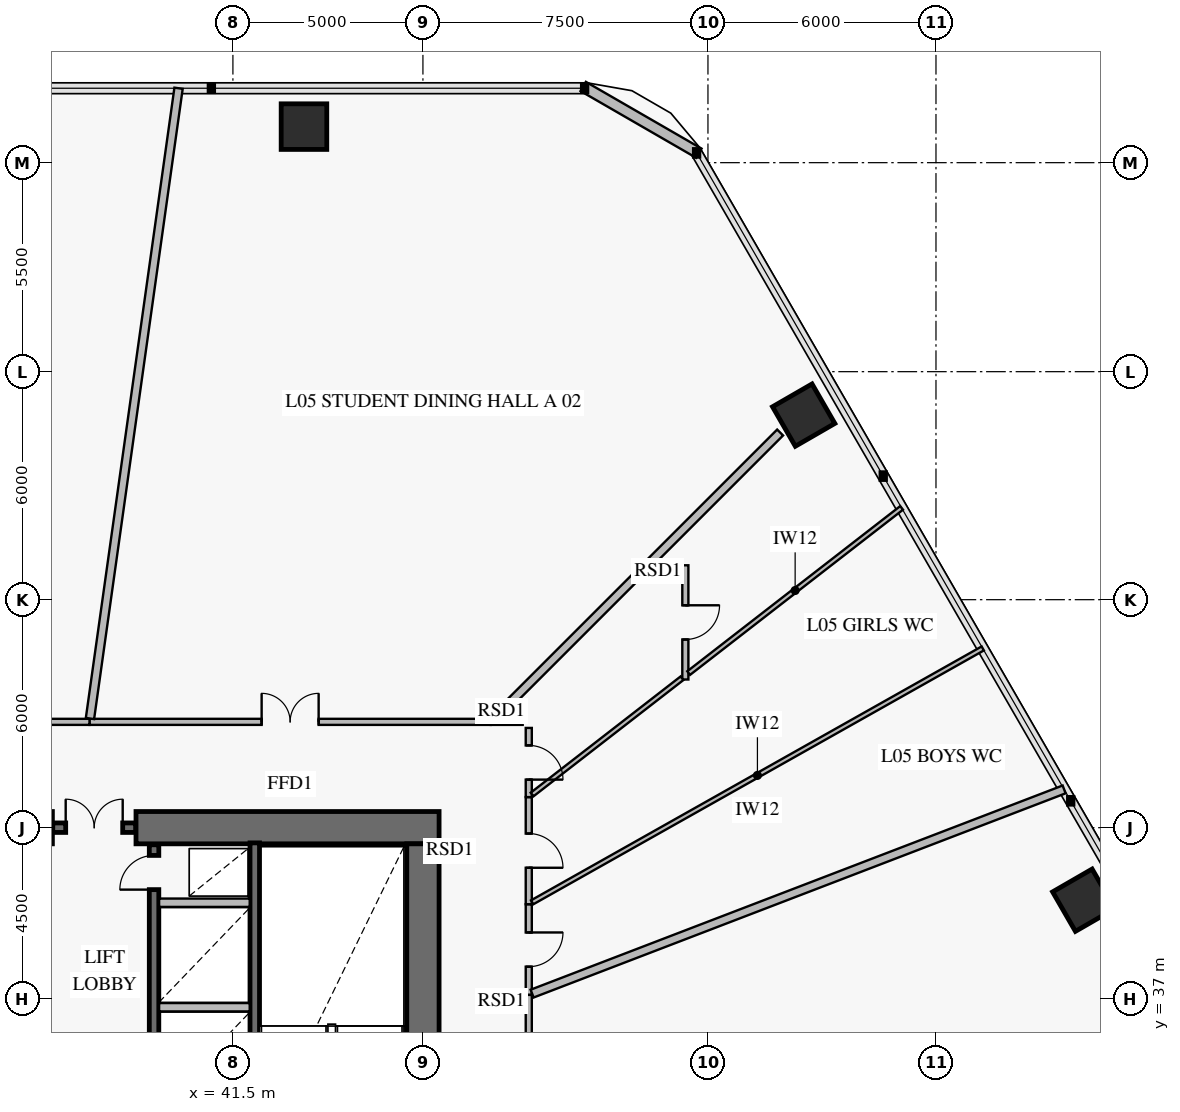
"""IFC4 building model, lengths in metres.
Left out: names, types, materials, properties, quantities, classifications, styles, units other than length and angle.
Written with IfcOpenShell. Run it as: python <this file> out.ifc"""

import sys

from ifc_helpers import new_model, si_unit, direction, frame, frame_2d, origin, origin_2d, place, context, subcontext, project, spatial, rectangle, extrude, element, fill, save


model = new_model("IFC4")
c1 = context("Model", 3, precision=1e-05, world=origin(), true_north=direction((0.0, 1.0)))
c2 = subcontext(c1, "Body", "Model", "MODEL_VIEW")
j1 = project(units=[si_unit("LENGTHUNIT", "METRE"), si_unit("PLANEANGLEUNIT", "RADIAN")], contexts=[c1])
p1 = place(None, origin())
s1 = spatial("IfcSite", under=j1, at=p1, CompositionType="ELEMENT")
p2 = place(p1, origin())
s2 = spatial("IfcBuilding", under=s1, at=p2, CompositionType="ELEMENT")
p3 = place(p2, frame((0.0, 0.0, 20.4)))
s3 = spatial("IfcBuildingStorey", under=s2, at=p3, CompositionType="ELEMENT", Elevation=20.4)
p4 = place(p3, frame((46.925, 41.5, 0.0), z_axis=(0.0, 0.0, 1.0), x_axis=(-1.0, 0.0, 0.0)))
e1 = element("IfcWall", 1, at=p4, inside=s3, PredefinedType="SHEAR", context=c2, shape_type="SweptSolid", body=[
    extrude(rectangle(XDim=7.975, YDim=0.85, at=frame_2d((3.988, 0.0))), origin(), (0.0, 0.0, 1.0), 4.2),
])
p5 = place(p3, frame((36.75, 41.5, 0.0), z_axis=(0.0, 0.0, 1.0), x_axis=(-1.0, 0.0, 0.0)))
e2 = element("IfcWall", 2, at=p5, inside=s3, PredefinedType="SHEAR", context=c2, shape_type="SweptSolid", body=[
    extrude(rectangle(XDim=11.675, YDim=0.85, at=frame_2d((5.837, 0.0))), origin(), (0.0, 0.0, 1.0), 4.2),
])
p6 = place(p5, frame((4.25, 0.0, 0.0)))
e3 = element("IfcOpeningElement", 3, at=p6, cuts=e2, PredefinedType="OPENING", context=c2, shape_type="SweptSolid", body=[
    extrude(rectangle(XDim=1.1, YDim=2.15, at=frame_2d((0.55, 1.075))), frame((0.0, 0.437, 0.0), z_axis=(0.0, -1.0, 0.0), x_axis=(1.0, 0.0, 0.0)), (0.0, 0.0, 1.0), 0.874),
])
p7 = place(p3, frame((46.5, 22.925, 0.0), z_axis=(0.0, 0.0, 1.0), x_axis=(0.0, 1.0, 0.0)))
e4 = element("IfcWall", 4, at=p7, inside=s3, PredefinedType="SHEAR", context=c2, shape_type="SweptSolid", body=[
    extrude(rectangle(XDim=18.15, YDim=0.85, at=frame_2d((9.075, 0.0))), origin(), (0.0, 0.0, 1.0), 4.2),
])
p8 = place(p7, frame((8.825, 0.0, 0.0)))
e5 = element("IfcOpeningElement", 5, at=p8, cuts=e4, PredefinedType="OPENING", context=c2, shape_type="SweptSolid", body=[
    extrude(rectangle(XDim=1.1, YDim=2.15, at=frame_2d((0.55, 1.075))), frame((0.0, 0.437, 0.0), z_axis=(0.0, -1.0, 0.0), x_axis=(1.0, 0.0, 0.0)), (0.0, 0.0, 1.0), 0.874),
])
for number, where, z_axis, x_axis in (
    (6, (63.889, 39.592, 0.0), (0.0, 0.0, 1.0), (-0.5, 0.866, 0.0)),
    (7, (56.519, 52.357, 0.0), (0.0, 0.0, 1.0), (-0.5, 0.866, 0.0)),
    (8, (43.37, 59.948, 0.0), (0.0, 0.0, 1.0), (-1.0, 0.0, 0.0)),
):
    element("IfcColumn", number, at=place(p3, frame(where, z_axis=z_axis, x_axis=x_axis)), inside=s3, PredefinedType="COLUMN", context=c2, shape_type="SweptSolid", body=[
        extrude(rectangle(XDim=1.2, YDim=1.2, at=origin_2d()), origin(), (0.0, 0.0, 1.0), 3.92),
    ])
p9 = place(p3, frame((50.717, 61.006, 0.0), z_axis=(0.0, 0.0, 1.0), x_axis=(0.866007452331, -0.500031091541, 0.0)))
e9 = element("IfcWall", 9, at=p9, inside=s3, PredefinedType="SOLIDWALL", context=c2, shape_type="SweptSolid", body=[
    extrude(rectangle(XDim=3.515, YDim=0.28, at=frame_2d((1.757, 0.0))), origin(), (0.0, 0.0, 1.0), 3.92),
])
p10 = place(p3, frame((36.76, 41.5, 0.0), z_axis=(0.0, 0.0, 1.0), x_axis=(1.0, 0.0, 0.0)))
e10 = element("IfcWall", 10, at=p10, inside=s3, PredefinedType="SOLIDWALL", context=c2, shape_type="SweptSolid", body=[
    extrude(rectangle(XDim=2.18, YDim=0.25, at=frame_2d((1.09, 0.0))), origin(), (0.0, 0.0, 1.0), 4.2),
])
p11 = place(p10, frame((0.34, 0.0, 0.0)))
e11 = element("IfcOpeningElement", 11, at=p11, cuts=e10, PredefinedType="OPENING", context=c2, shape_type="SweptSolid", body=[
    extrude(rectangle(XDim=1.5, YDim=2.15, at=frame_2d((0.75, 1.075))), frame((0.0, 0.137, 0.0), z_axis=(0.0, -1.0, 0.0), x_axis=(1.0, 0.0, 0.0)), (0.0, 0.0, 1.0), 0.274),
])
p12 = place(p3, frame((42.075, 31.4, 0.0), z_axis=(0.0, 0.0, 1.0), x_axis=(0.0, 1.0, 0.0)))
e12 = element("IfcWall", 12, at=p12, inside=s3, PredefinedType="SOLIDWALL", context=c2, shape_type="SweptSolid", body=[
    extrude(rectangle(XDim=9.7, YDim=0.25, at=frame_2d((4.85, 0.0))), origin(), (0.0, 0.0, 1.0), 4.2),
])
p13 = place(p3, frame((39.425, 31.4, 0.0), z_axis=(0.0, 0.0, 1.0), x_axis=(0.0, 1.0, 0.0)))
e13 = element("IfcWall", 13, at=p13, inside=s3, PredefinedType="SOLIDWALL", context=c2, shape_type="SweptSolid", body=[
    extrude(rectangle(XDim=9.65, YDim=0.25, at=frame_2d((4.825, 0.0))), origin(), (0.0, 0.0, 1.0), 4.2),
])
p14 = place(p13, frame((8.47, 0.0, 0.0)))
e14 = element("IfcOpeningElement", 14, at=p14, cuts=e13, PredefinedType="OPENING", context=c2, shape_type="SweptSolid", body=[
    extrude(rectangle(XDim=0.9, YDim=2.1, at=frame_2d((0.45, 1.05))), frame((0.0, 0.137, 0.0), z_axis=(0.0, -1.0, 0.0), x_axis=(1.0, 0.0, 0.0)), (0.0, 0.0, 1.0), 0.274),
])
p15 = place(p3, frame((49.285, 37.1, 0.0), z_axis=(0.0, 0.0, 1.0), x_axis=(0.0, 1.0, 0.0)))
e15 = element("IfcWall", 15, at=p15, inside=s3, PredefinedType="PARTITIONING", context=c2, shape_type="SweptSolid", body=[
    extrude(rectangle(XDim=2.386, YDim=0.16, at=frame_2d((1.193, 0.0))), origin(), (0.0, 0.0, 1.0), 3.92),
])
p16 = place(p15, frame((0.743, 0.0, 0.0)))
e16 = element("IfcOpeningElement", 16, at=p16, cuts=e15, PredefinedType="OPENING", context=c2, shape_type="SweptSolid", body=[
    extrude(rectangle(XDim=0.9, YDim=2.1, at=frame_2d((0.45, 1.05))), frame((0.0, 0.092, 0.0), z_axis=(0.0, -1.0, 0.0), x_axis=(1.0, 0.0, 0.0)), (0.0, 0.0, 1.0), 0.184),
])
p17 = place(p3, frame((49.285, 39.486, 0.0), z_axis=(0.0, 0.0, 1.0), x_axis=(0.0, 1.0, 0.0)))
e17 = element("IfcWall", 17, at=p17, inside=s3, PredefinedType="PARTITIONING", context=c2, shape_type="SweptSolid", body=[
    extrude(rectangle(XDim=2.819, YDim=0.16, at=frame_2d((1.41, 0.0))), origin(), (0.0, 0.0, 1.0), 3.92),
])
p18 = place(p17, frame((0.96, 0.0, 0.0)))
e18 = element("IfcOpeningElement", 18, at=p18, cuts=e17, PredefinedType="OPENING", context=c2, shape_type="SweptSolid", body=[
    extrude(rectangle(XDim=0.9, YDim=2.1, at=frame_2d((0.45, 1.05))), frame((0.0, 0.092, 0.0), z_axis=(0.0, -1.0, 0.0), x_axis=(1.0, 0.0, 0.0)), (0.0, 0.0, 1.0), 0.184),
])
p19 = place(p3, frame((53.405, 48.405, 0.0), z_axis=(0.0, 0.0, 1.0), x_axis=(0.0, -1.0, 0.0)))
e19 = element("IfcWall", 19, at=p19, inside=s3, PredefinedType="PARTITIONING", context=c2, shape_type="SweptSolid", body=[
    extrude(rectangle(XDim=3.006, YDim=0.16, at=frame_2d((1.503, 0.0))), origin(), (0.0, 0.0, 1.0), 3.92),
])
p20 = place(p19, frame((1.053, 0.0, 0.0)))
e20 = element("IfcOpeningElement", 20, at=p20, cuts=e19, PredefinedType="OPENING", context=c2, shape_type="SweptSolid", body=[
    extrude(rectangle(XDim=0.9, YDim=2.1, at=frame_2d((0.45, 1.05))), frame((0.0, 0.092, 0.0), z_axis=(0.0, -1.0, 0.0), x_axis=(1.0, 0.0, 0.0)), (0.0, 0.0, 1.0), 0.184),
])
p21 = place(p3, frame((49.285, 42.305, 0.0), z_axis=(0.0, 0.0, 1.0), x_axis=(0.0, 1.0, 0.0)))
e21 = element("IfcWall", 21, at=p21, inside=s3, PredefinedType="PARTITIONING", context=c2, shape_type="SweptSolid", body=[
    extrude(rectangle(XDim=1.82, YDim=0.16, at=frame_2d((0.91, 0.0))), origin(), (0.0, 0.0, 1.0), 3.92),
])
p22 = place(p21, frame((0.46, 0.0, 0.0)))
e22 = element("IfcOpeningElement", 22, at=p22, cuts=e21, PredefinedType="OPENING", context=c2, shape_type="SweptSolid", body=[
    extrude(rectangle(XDim=0.9, YDim=2.1, at=frame_2d((0.45, 1.05))), frame((0.0, 0.092, 0.0), z_axis=(0.0, -1.0, 0.0), x_axis=(1.0, 0.0, 0.0)), (0.0, 0.0, 1.0), 0.184),
])
p23 = place(p3, frame((48.285, 44.285, 0.0), z_axis=(0.0, 0.0, 1.0), x_axis=(-1.0, 0.0, 0.0)))
e23 = element("IfcWall", 23, at=p23, inside=s3, PredefinedType="PARTITIONING", context=c2, shape_type="SweptSolid", body=[
    extrude(rectangle(XDim=10.558, YDim=0.16, at=frame_2d((5.279, 0.0))), origin(), (0.0, 0.0, 1.0), 3.22),
])
p24 = place(p23, frame((4.529, 0.0, 0.0)))
e24 = element("IfcOpeningElement", 24, at=p24, cuts=e23, PredefinedType="OPENING", context=c2, shape_type="SweptSolid", body=[
    extrude(rectangle(XDim=1.5, YDim=2.15, at=frame_2d((0.75, 1.075))), frame((0.0, 0.092, 0.0), z_axis=(0.0, -1.0, 0.0), x_axis=(1.0, 0.0, 0.0)), (0.0, 0.0, 1.0), 0.184),
])
p25 = place(p3, frame((37.727, 44.285, 0.0), z_axis=(0.0, 0.0, 1.0), x_axis=(-1.0, 0.0, 0.0)))
e25 = element("IfcWall", 25, at=p25, inside=s3, PredefinedType="PARTITIONING", context=c2, shape_type="SweptSolid", body=[
    extrude(rectangle(XDim=8.536, YDim=0.16, at=frame_2d((4.268, 0.0))), origin(), (0.0, 0.0, 1.0), 3.22),
])
p26 = place(p25, frame((3.518, 0.0, 0.0)))
e26 = element("IfcOpeningElement", 26, at=p26, cuts=e25, PredefinedType="OPENING", context=c2, shape_type="SweptSolid", body=[
    extrude(rectangle(XDim=1.5, YDim=2.15, at=frame_2d((0.75, 1.075))), frame((0.0, 0.092, 0.0), z_axis=(0.0, -1.0, 0.0), x_axis=(1.0, 0.0, 0.0)), (0.0, 0.0, 1.0), 0.184),
])
p27 = place(p3, frame((49.285, 27.683, 0.0), z_axis=(0.0, 0.0, 1.0), x_axis=(0.0, 1.0, 0.0)))
e27 = element("IfcWall", 27, at=p27, inside=s3, PredefinedType="PARTITIONING", context=c2, shape_type="SweptSolid", body=[
    extrude(rectangle(XDim=9.416, YDim=0.16, at=frame_2d((4.708, 0.0))), origin(), (0.0, 0.0, 1.0), 3.22),
])
p28 = place(p27, frame((4.233, 0.0, 0.0)))
e28 = element("IfcOpeningElement", 28, at=p28, cuts=e27, PredefinedType="OPENING", context=c2, shape_type="SweptSolid", body=[
    extrude(rectangle(XDim=0.95, YDim=2.1, at=frame_2d((0.475, 1.05))), frame((0.0, 0.092, 0.0), z_axis=(0.0, -1.0, 0.0), x_axis=(1.0, 0.0, 0.0)), (0.0, 0.0, 1.0), 0.184),
])
for number, where, z_axis, x_axis in (
    (29, (39.558, 36.775, 0.0), (0.0, 0.0, 1.0), (1.0, 0.0, 0.0)),
    (30, (39.558, 39.525, 0.0), (0.0, 0.0, 1.0), (1.0, 0.0, 0.0)),
):
    element("IfcWall", number, at=place(p3, frame(where, z_axis=z_axis, x_axis=x_axis)), inside=s3, PredefinedType="PARTITIONING", context=c2, shape_type="SweptSolid", body=[
        extrude(rectangle(XDim=2.384, YDim=0.22, at=frame_2d((1.192, 0.0))), origin(), (0.0, 0.0, 1.0), 3.92),
    ])
p29 = place(p3, frame((49.373, 37.134, 0.0), z_axis=(0.0, 0.0, 1.0), x_axis=(0.933584586871, 0.358357111214, 0.0)))
e31 = element("IfcWall", 31, at=p29, inside=s3, PredefinedType="PARTITIONING", context=c2, shape_type="SweptSolid", body=[
    extrude(rectangle(XDim=14.995, YDim=0.22, at=frame_2d((7.498, 0.0))), origin(), (0.0, 0.0, 1.0), 3.17),
])
p30 = place(p3, frame((49.373, 39.535, 0.0), z_axis=(0.0, 0.0, 1.0), x_axis=(0.871218886354, 0.490894746417, 0.0)))
e32 = element("IfcWall", 32, at=p30, inside=s3, PredefinedType="PARTITIONING", context=c2, shape_type="SweptSolid", body=[
    extrude(rectangle(XDim=13.61, YDim=0.12, at=frame_2d((6.805, 0.0))), origin(), (0.0, 0.0, 1.0), 3.17),
])
p31 = place(p3, frame((49.373, 42.373, 0.0), z_axis=(0.0, 0.0, 1.0), x_axis=(0.790162754328, 0.612897072658, 0.0)))
e33 = element("IfcWall", 33, at=p31, inside=s3, PredefinedType="PARTITIONING", context=c2, shape_type="SweptSolid", body=[
    extrude(rectangle(XDim=4.991, YDim=0.12, at=frame_2d((2.496, 0.0))), origin(), (0.0, 0.0, 1.0), 3.47),
])
p32 = place(p3, frame((53.493, 45.569, 0.0), z_axis=(0.0, 0.0, 1.0), x_axis=(0.79017658067, 0.612879246965, 0.0)))
e34 = element("IfcWall", 34, at=p32, inside=s3, PredefinedType="PARTITIONING", context=c2, shape_type="SweptSolid", body=[
    extrude(rectangle(XDim=7.09, YDim=0.12, at=frame_2d((3.545, 0.0))), origin(), (0.0, 0.0, 1.0), 3.17),
])
p33 = place(p3, frame((52.292, 48.405, 0.0), z_axis=(0.0, 0.0, 1.0), x_axis=(1.0, 0.0, 0.0)))
e35 = element("IfcWall", 35, at=p33, inside=s3, PredefinedType="PARTITIONING", context=c2, shape_type="SweptSolid", body=[
    extrude(rectangle(XDim=1.025, YDim=0.16, at=frame_2d((0.512, 0.0))), origin(), (0.0, 0.0, 1.0), 3.22),
])
p34 = place(p3, frame((49.125, 44.285, 0.0), z_axis=(0.0, 0.0, 1.0), x_axis=(-1.0, 0.0, 0.0)))
e36 = element("IfcWall", 36, at=p34, inside=s3, PredefinedType="PARTITIONING", context=c2, shape_type="SweptSolid", body=[
    extrude(rectangle(XDim=0.84, YDim=0.16, at=frame_2d((0.42, 0.0))), origin(), (0.0, 0.0, 1.0), 3.22),
])
p35 = place(p3, frame((48.373, 44.373, 0.0), z_axis=(0.0, 0.0, 1.0), x_axis=(0.707106781187, 0.707106781187, 0.0)))
e37 = element("IfcWall", 37, at=p35, inside=s3, PredefinedType="PARTITIONING", context=c2, shape_type="SweptSolid", body=[
    extrude(rectangle(XDim=5.577, YDim=0.22, at=frame_2d((2.789, 0.0))), origin(), (0.0, 0.0, 1.0), 3.22),
])
p36 = place(p3, frame((52.493, 48.493, 0.0), z_axis=(0.0, 0.0, 1.0), x_axis=(0.707106781187, 0.707106781187, 0.0)))
e38 = element("IfcWall", 38, at=p36, inside=s3, PredefinedType="PARTITIONING", context=c2, shape_type="SweptSolid", body=[
    extrude(rectangle(XDim=4.817, YDim=0.22, at=frame_2d((2.408, 0.0))), origin(), (0.0, 0.0, 1.0), 3.22),
])
p37 = place(p3, frame((37.739, 44.373, 0.0), z_axis=(0.0, 0.0, 1.0), x_axis=(0.139165938444, 0.990269075341, 0.0)))
e39 = element("IfcWall", 39, at=p37, inside=s3, PredefinedType="PARTITIONING", context=c2, shape_type="SweptSolid", body=[
    extrude(rectangle(XDim=16.749, YDim=0.22, at=frame_2d((8.374, 0.0))), origin(), (0.0, 0.0, 1.0), 3.17),
])
p38 = place(p11, origin())
e40 = element("IfcDoor", 40, at=p38, inside=s3, OperationType="DOUBLE_DOOR_SINGLE_SWING", PredefinedType="DOOR", context=c2, shape_type="SweptSolid", body=[
    extrude(rectangle(XDim=1.5, YDim=2.15, at=frame_2d((0.75, 1.075))), frame((0.0, 0.025, 0.0), z_axis=(0.0, -1.0, 0.0), x_axis=(1.0, 0.0, 0.0)), (0.0, 0.0, 1.0), 0.05),
])
fill(e11, e40)
p39 = place(p14, origin())
e41 = element("IfcDoor", 41, at=p39, inside=s3, OperationType="SINGLE_SWING_LEFT", PredefinedType="DOOR", context=c2, shape_type="SweptSolid", body=[
    extrude(rectangle(XDim=0.9, YDim=2.1, at=frame_2d((0.45, 1.05))), frame((0.0, 0.025, 0.0), z_axis=(0.0, -1.0, 0.0), x_axis=(1.0, 0.0, 0.0)), (0.0, 0.0, 1.0), 0.05),
])
fill(e14, e41)
p40 = place(p16, frame((0.9, 0.0, 0.0), z_axis=(0.0, 0.0, 1.0), x_axis=(-1.0, 0.0, 0.0)))
e42 = element("IfcDoor", 42, at=p40, inside=s3, OperationType="SINGLE_SWING_LEFT", PredefinedType="DOOR", context=c2, shape_type="SweptSolid", body=[
    extrude(rectangle(XDim=0.9, YDim=2.1, at=frame_2d((0.45, 1.05))), frame((0.0, 0.025, 0.0), z_axis=(0.0, -1.0, 0.0), x_axis=(1.0, 0.0, 0.0)), (0.0, 0.0, 1.0), 0.05),
])
fill(e16, e42)
p41 = place(p18, frame((0.9, 0.0, 0.0), z_axis=(0.0, 0.0, 1.0), x_axis=(-1.0, 0.0, 0.0)))
e43 = element("IfcDoor", 43, at=p41, inside=s3, OperationType="SINGLE_SWING_RIGHT", PredefinedType="DOOR", context=c2, shape_type="SweptSolid", body=[
    extrude(rectangle(XDim=0.9, YDim=2.1, at=frame_2d((0.45, 1.05))), frame((0.0, 0.025, 0.0), z_axis=(0.0, -1.0, 0.0), x_axis=(1.0, 0.0, 0.0)), (0.0, 0.0, 1.0), 0.05),
])
fill(e18, e43)
p42 = place(p20, origin())
e44 = element("IfcDoor", 44, at=p42, inside=s3, OperationType="SINGLE_SWING_LEFT", PredefinedType="DOOR", context=c2, shape_type="SweptSolid", body=[
    extrude(rectangle(XDim=0.9, YDim=2.1, at=frame_2d((0.45, 1.05))), frame((0.0, 0.025, 0.0), z_axis=(0.0, -1.0, 0.0), x_axis=(1.0, 0.0, 0.0)), (0.0, 0.0, 1.0), 0.05),
])
fill(e20, e44)
p43 = place(p22, frame((0.9, 0.0, 0.0), z_axis=(0.0, 0.0, 1.0), x_axis=(-1.0, 0.0, 0.0)))
e45 = element("IfcDoor", 45, at=p43, inside=s3, OperationType="SINGLE_SWING_RIGHT", PredefinedType="DOOR", context=c2, shape_type="SweptSolid", body=[
    extrude(rectangle(XDim=0.9, YDim=2.1, at=frame_2d((0.45, 1.05))), frame((0.0, 0.025, 0.0), z_axis=(0.0, -1.0, 0.0), x_axis=(1.0, 0.0, 0.0)), (0.0, 0.0, 1.0), 0.05),
])
fill(e22, e45)
p44 = place(p24, frame((1.5, 0.0, 0.0), z_axis=(0.0, 0.0, 1.0), x_axis=(-1.0, 0.0, 0.0)))
e46 = element("IfcDoor", 46, at=p44, inside=s3, OperationType="DOUBLE_DOOR_SINGLE_SWING", PredefinedType="DOOR", context=c2, shape_type="SweptSolid", body=[
    extrude(rectangle(XDim=1.5, YDim=2.15, at=frame_2d((0.75, 1.075))), frame((0.0, 0.025, 0.0), z_axis=(0.0, -1.0, 0.0), x_axis=(1.0, 0.0, 0.0)), (0.0, 0.0, 1.0), 0.05),
])
fill(e24, e46)
save(model, sys.argv[1])
